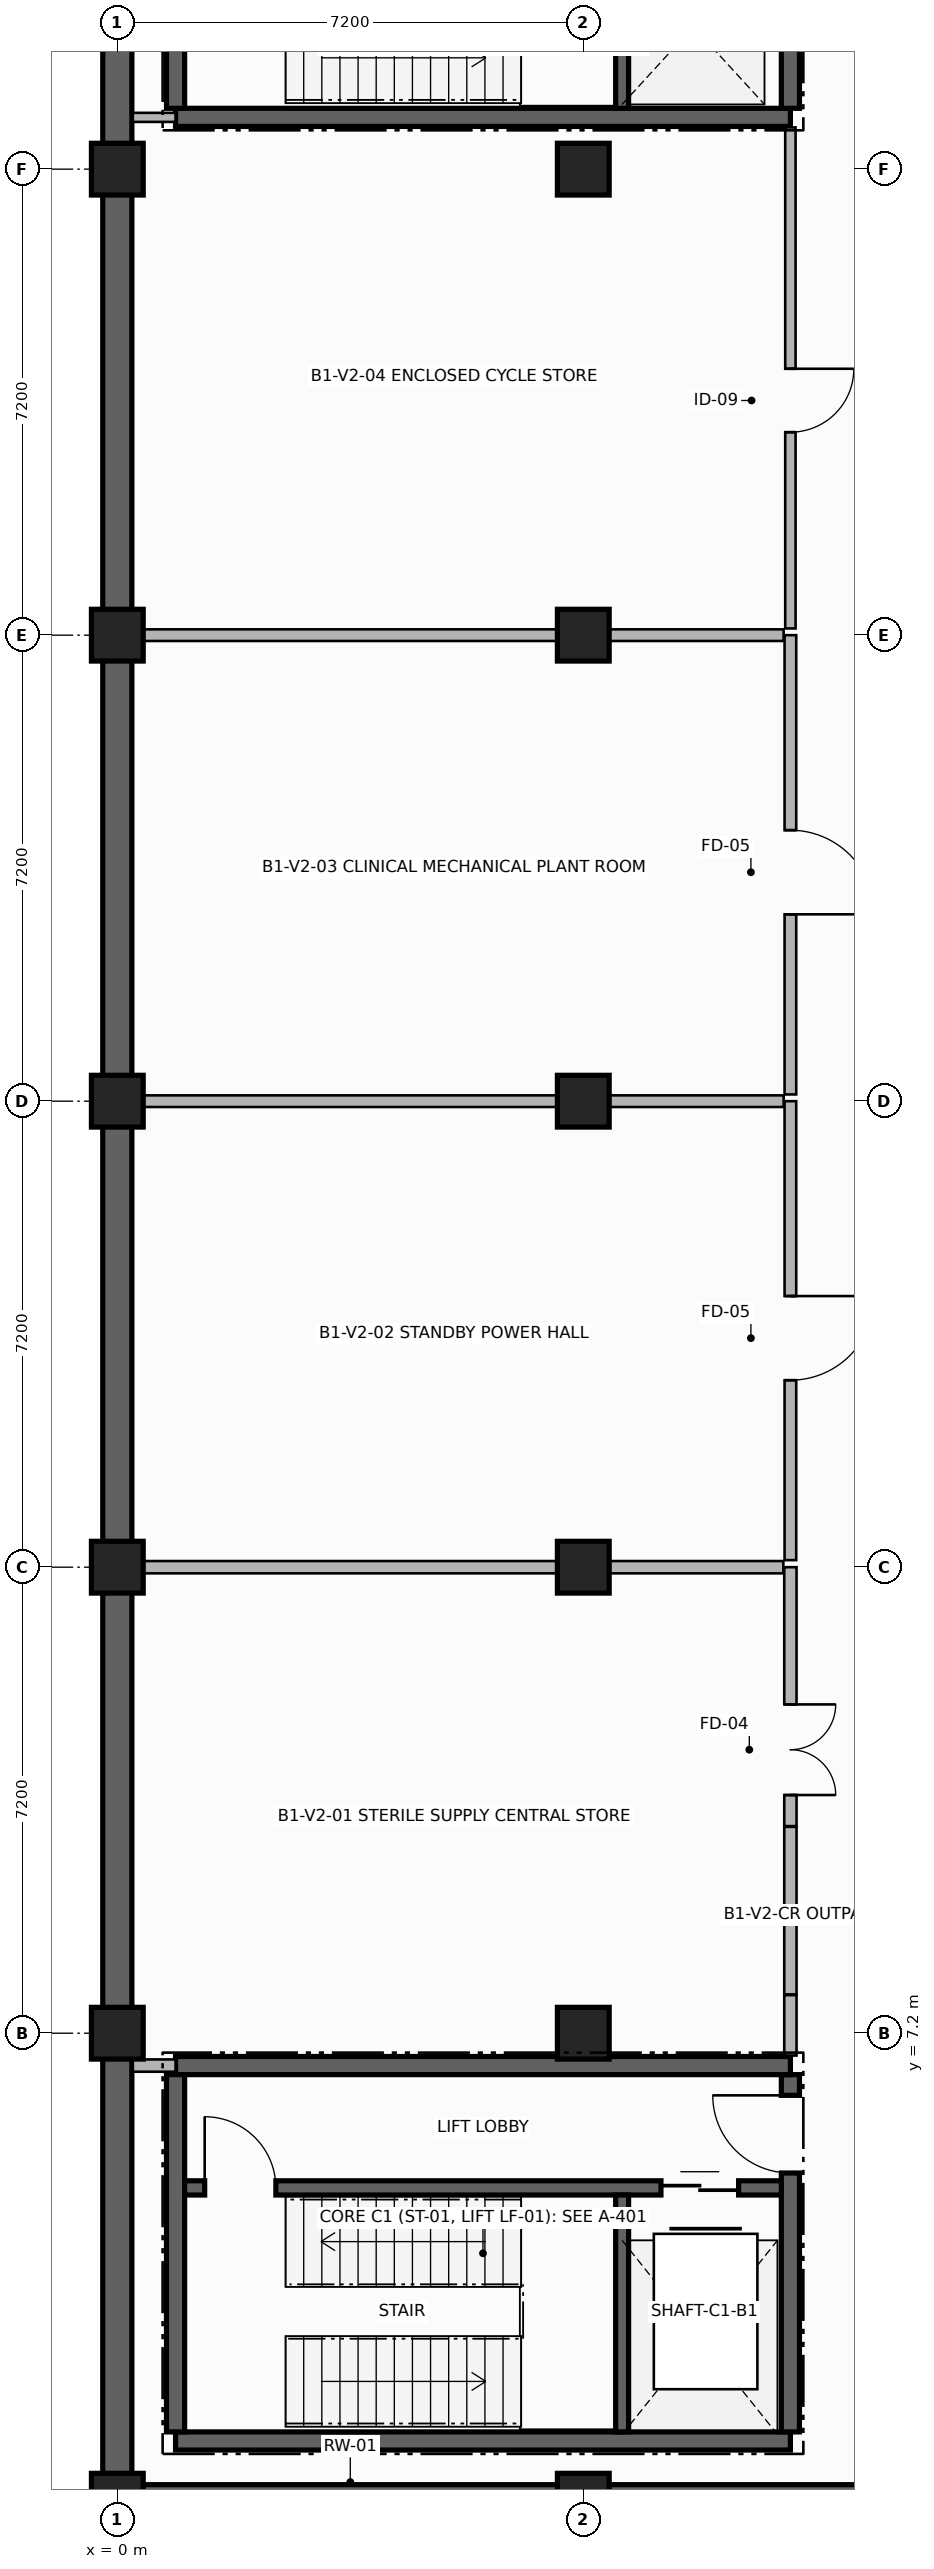
"""IFC4 building model, lengths in metres.
Left out: names, types, materials, properties, quantities, classifications, styles, units other than length and angle.
Written with IfcOpenShell. Run it as: python <this file> out.ifc"""

import sys

from ifc_helpers import new_model, si_unit, direction, frame, frame_2d, origin, origin_2d, place, context, subcontext, project, spatial, rectangle, extrude, element, fill, save


model = new_model("IFC4")
c1 = context("Model", 3, precision=1e-05, world=origin(), true_north=direction((0.0, 1.0)))
c2 = subcontext(c1, "Body", "Model", "MODEL_VIEW")
j1 = project(units=[si_unit("LENGTHUNIT", "METRE"), si_unit("PLANEANGLEUNIT", "RADIAN")], contexts=[c1])
p1 = place(None, origin())
s1 = spatial("IfcSite", under=j1, at=p1, CompositionType="ELEMENT")
p2 = place(p1, origin())
s2 = spatial("IfcBuilding", under=s1, at=p2, CompositionType="ELEMENT")
p3 = place(p2, frame((0.0, 0.0, -4.2)))
s3 = spatial("IfcBuildingStorey", under=s2, at=p3, CompositionType="ELEMENT", Elevation=-4.2)
for number, where, z_axis, x_axis in (
    (1, (0.0, 0.0, -0.4), (0.0, 0.0, 1.0), (1.0, 0.0, 0.0)),
    (2, (0.0, 7.2, -0.4), (0.0, 0.0, 1.0), (1.0, 0.0, 0.0)),
    (3, (0.0, 14.4, -0.4), (0.0, 0.0, 1.0), (1.0, 0.0, 0.0)),
    (4, (0.0, 21.6, -0.4), (0.0, 0.0, 1.0), (1.0, 0.0, 0.0)),
    (5, (0.0, 28.8, -0.4), (0.0, 0.0, 1.0), (1.0, 0.0, 0.0)),
    (6, (0.0, 36.0, -0.4), (0.0, 0.0, 1.0), (1.0, 0.0, 0.0)),
    (7, (7.2, 0.0, -0.4), (0.0, 0.0, 1.0), (1.0, 0.0, 0.0)),
    (8, (7.2, 7.2, -0.4), (0.0, 0.0, 1.0), (1.0, 0.0, 0.0)),
    (9, (7.2, 14.4, -0.4), (0.0, 0.0, 1.0), (1.0, 0.0, 0.0)),
    (10, (7.2, 21.6, -0.4), (0.0, 0.0, 1.0), (1.0, 0.0, 0.0)),
    (11, (7.2, 28.8, -0.4), (0.0, 0.0, 1.0), (1.0, 0.0, 0.0)),
    (12, (7.2, 36.0, -0.4), (0.0, 0.0, 1.0), (1.0, 0.0, 0.0)),
):
    element("IfcColumn", number, at=place(p3, frame(where, z_axis=z_axis, x_axis=x_axis)), inside=s3, PredefinedType="COLUMN", context=c2, shape_type="SweptSolid", body=[
        extrude(rectangle(XDim=0.8, YDim=0.8, at=origin_2d()), origin(), (0.0, 0.0, 1.0), 4.32),
    ])
for number, where, z_axis, x_axis in (
    (13, (0.0, 0.0, 0.0), (0.0, 0.0, 1.0), (1.0, 0.0, 0.0)),
    (14, (7.2, 0.0, 0.0), (0.0, 0.0, 1.0), (1.0, 0.0, 0.0)),
    (15, (0.0, 43.2, 0.0), (0.0, 0.0, 1.0), (0.0, -1.0, 0.0)),
    (16, (0.0, 36.0, 0.0), (0.0, 0.0, 1.0), (0.0, -1.0, 0.0)),
    (17, (0.0, 28.8, 0.0), (0.0, 0.0, 1.0), (0.0, -1.0, 0.0)),
):
    element("IfcWall", number, at=place(p3, frame(where, z_axis=z_axis, x_axis=x_axis)), inside=s3, PredefinedType="ELEMENTEDWALL", context=c2, shape_type="SweptSolid", body=[
        extrude(rectangle(XDim=7.2, YDim=0.45, at=frame_2d((3.6, 0.0))), origin(), (0.0, 0.0, 1.0), 3.32),
    ])
p4 = place(p3, frame((0.0, 21.6, 0.0), z_axis=(0.0, 0.0, 1.0), x_axis=(0.0, -1.0, 0.0)))
e18 = element("IfcWall", 18, at=p4, inside=s3, PredefinedType="ELEMENTEDWALL", context=c2, shape_type="SweptSolid", body=[
    extrude(rectangle(XDim=7.2, YDim=0.45, at=frame_2d((3.6, 0.0))), origin(), (0.0, 0.0, 1.0), 3.32),
])
for number, where, z_axis, x_axis in (
    (19, (0.0, 14.4, 0.0), (0.0, 0.0, 1.0), (0.0, -1.0, 0.0)),
    (20, (0.0, 7.2, 0.0), (0.0, 0.0, 1.0), (0.0, -1.0, 0.0)),
):
    element("IfcWall", number, at=place(p3, frame(where, z_axis=z_axis, x_axis=x_axis)), inside=s3, PredefinedType="ELEMENTEDWALL", context=c2, shape_type="SweptSolid", body=[
        extrude(rectangle(XDim=7.2, YDim=0.45, at=frame_2d((3.6, 0.0))), origin(), (0.0, 0.0, 1.0), 3.32),
    ])
p5 = place(p3, frame((0.9, 0.9, 0.0), z_axis=(0.0, 0.0, 1.0), x_axis=(1.0, 0.0, 0.0)))
e21 = element("IfcWall", 21, at=p5, inside=s3, PredefinedType="SHEAR", context=c2, shape_type="SweptSolid", body=[
    extrude(rectangle(XDim=9.5, YDim=0.28, at=frame_2d((4.75, 0.0))), origin(), (0.0, 0.0, 1.0), 3.9),
])
p6 = place(p3, frame((10.4, 1.04, 0.0), z_axis=(0.0, 0.0, 1.0), x_axis=(0.0, 1.0, 0.0)))
e22 = element("IfcWall", 22, at=p6, inside=s3, PredefinedType="SHEAR", context=c2, shape_type="SweptSolid", body=[
    extrude(rectangle(XDim=5.52, YDim=0.28, at=frame_2d((2.76, 0.0))), origin(), (0.0, 0.0, 1.0), 3.9),
])
p7 = place(p6, frame((4.0, 0.0, 0.0)))
e23 = element("IfcOpeningElement", 23, at=p7, cuts=e22, PredefinedType="OPENING", context=c2, shape_type="SweptSolid", body=[
    extrude(rectangle(XDim=1.2, YDim=2.25, at=frame_2d((0.6, 1.125))), frame((0.0, 0.15, 0.0), z_axis=(0.0, -1.0, 0.0), x_axis=(1.0, 0.0, 0.0)), (0.0, 0.0, 1.0), 0.3),
])
p8 = place(p3, frame((10.4, 6.7, 0.0), z_axis=(0.0, 0.0, 1.0), x_axis=(-1.0, 0.0, 0.0)))
e24 = element("IfcWall", 24, at=p8, inside=s3, PredefinedType="SHEAR", context=c2, shape_type="SweptSolid", body=[
    extrude(rectangle(XDim=9.5, YDim=0.28, at=frame_2d((4.75, 0.0))), origin(), (0.0, 0.0, 1.0), 3.9),
])
p9 = place(p3, frame((0.9, 6.56, 0.0), z_axis=(0.0, 0.0, 1.0), x_axis=(0.0, -1.0, 0.0)))
e25 = element("IfcWall", 25, at=p9, inside=s3, PredefinedType="SHEAR", context=c2, shape_type="SweptSolid", body=[
    extrude(rectangle(XDim=5.52, YDim=0.28, at=frame_2d((2.76, 0.0))), origin(), (0.0, 0.0, 1.0), 3.9),
])
p10 = place(p3, frame((1.04, 4.81, 0.0), z_axis=(0.0, 0.0, 1.0), x_axis=(1.0, 0.0, 0.0)))
e26 = element("IfcWall", 26, at=p10, inside=s3, PredefinedType="SHEAR", context=c2, shape_type="SweptSolid", body=[
    extrude(rectangle(XDim=9.22, YDim=0.22, at=frame_2d((4.61, 0.0))), origin(), (0.0, 0.0, 1.0), 3.9),
])
p11 = place(p10, frame((0.31, 0.0, 0.0)))
e27 = element("IfcOpeningElement", 27, at=p11, cuts=e26, PredefinedType="OPENING", context=c2, shape_type="SweptSolid", body=[
    extrude(rectangle(XDim=1.1, YDim=2.15, at=frame_2d((0.55, 1.075))), frame((0.0, 0.12, 0.0), z_axis=(0.0, -1.0, 0.0), x_axis=(1.0, 0.0, 0.0)), (0.0, 0.0, 1.0), 0.24),
])
p12 = place(p10, frame((7.36, 0.0, 0.0)))
e28 = element("IfcOpeningElement", 28, at=p12, cuts=e26, PredefinedType="OPENING", context=c2, shape_type="SweptSolid", body=[
    extrude(rectangle(XDim=1.2, YDim=2.2, at=frame_2d((0.6, 1.1))), frame((0.0, 0.12, 0.0), z_axis=(0.0, -1.0, 0.0), x_axis=(1.0, 0.0, 0.0)), (0.0, 0.0, 1.0), 0.24),
])
p13 = place(p3, frame((7.8, 1.04, 0.0), z_axis=(0.0, 0.0, 1.0), x_axis=(0.0, 1.0, 0.0)))
e29 = element("IfcWall", 29, at=p13, inside=s3, PredefinedType="SHEAR", context=c2, shape_type="SweptSolid", body=[
    extrude(rectangle(XDim=3.66, YDim=0.2, at=frame_2d((1.83, 0.0))), origin(), (0.0, 0.0, 1.0), 3.9),
])
p14 = place(p3, frame((0.9, 36.8, 0.0), z_axis=(0.0, 0.0, 1.0), x_axis=(1.0, 0.0, 0.0)))
e30 = element("IfcWall", 30, at=p14, inside=s3, PredefinedType="SHEAR", context=c2, shape_type="SweptSolid", body=[
    extrude(rectangle(XDim=9.5, YDim=0.28, at=frame_2d((4.75, 0.0))), origin(), (0.0, 0.0, 1.0), 3.9),
])
p15 = place(p3, frame((10.4, 36.94, 0.0), z_axis=(0.0, 0.0, 1.0), x_axis=(0.0, 1.0, 0.0)))
e31 = element("IfcWall", 31, at=p15, inside=s3, PredefinedType="SHEAR", context=c2, shape_type="SweptSolid", body=[
    extrude(rectangle(XDim=5.52, YDim=0.28, at=frame_2d((2.76, 0.0))), origin(), (0.0, 0.0, 1.0), 3.9),
])
p16 = place(p15, frame((4.0, 0.0, 0.0)))
e32 = element("IfcOpeningElement", 32, at=p16, cuts=e31, PredefinedType="OPENING", context=c2, shape_type="SweptSolid", body=[
    extrude(rectangle(XDim=1.2, YDim=2.25, at=frame_2d((0.6, 1.125))), frame((0.0, 0.15, 0.0), z_axis=(0.0, -1.0, 0.0), x_axis=(1.0, 0.0, 0.0)), (0.0, 0.0, 1.0), 0.3),
])
p17 = place(p3, frame((0.9, 42.46, 0.0), z_axis=(0.0, 0.0, 1.0), x_axis=(0.0, -1.0, 0.0)))
e33 = element("IfcWall", 33, at=p17, inside=s3, PredefinedType="SHEAR", context=c2, shape_type="SweptSolid", body=[
    extrude(rectangle(XDim=5.52, YDim=0.28, at=frame_2d((2.76, 0.0))), origin(), (0.0, 0.0, 1.0), 3.9),
])
p18 = place(p3, frame((7.8, 36.94, 0.0), z_axis=(0.0, 0.0, 1.0), x_axis=(0.0, 1.0, 0.0)))
e34 = element("IfcWall", 34, at=p18, inside=s3, PredefinedType="SHEAR", context=c2, shape_type="SweptSolid", body=[
    extrude(rectangle(XDim=3.66, YDim=0.2, at=frame_2d((1.83, 0.0))), origin(), (0.0, 0.0, 1.0), 3.9),
])
p19 = place(p3, frame((10.4, 14.4, 0.0), z_axis=(0.0, 0.0, 1.0), x_axis=(0.0, -1.0, 0.0)))
e35 = element("IfcWall", 35, at=p19, inside=s3, PredefinedType="PARTITIONING", context=c2, shape_type="SweptSolid", body=[
    extrude(rectangle(XDim=4.0, YDim=0.19, at=frame_2d((2.0, 0.0))), origin(), (0.0, 0.0, 1.0), 3.26),
])
p20 = place(p19, frame((2.12, 0.0, 0.0)))
e36 = element("IfcOpeningElement", 36, at=p20, cuts=e35, PredefinedType="OPENING", context=c2, shape_type="SweptSolid", body=[
    extrude(rectangle(XDim=1.4, YDim=2.25, at=frame_2d((0.7, 1.125))), frame((0.0, 0.105, 0.0), z_axis=(0.0, -1.0, 0.0), x_axis=(1.0, 0.0, 0.0)), (0.0, 0.0, 1.0), 0.21),
])
p21 = place(p3, frame((10.4, 10.388, 0.0), z_axis=(0.0, 0.0, 1.0), x_axis=(0.0, -1.0, 0.0)))
e37 = element("IfcWall", 37, at=p21, inside=s3, PredefinedType="PARTITIONING", context=c2, shape_type="SweptSolid", body=[
    extrude(rectangle(XDim=2.588, YDim=0.19, at=frame_2d((1.294, 0.0))), origin(), (0.0, 0.0, 1.0), 3.26),
])
p22 = place(p3, frame((10.4, 7.788, 0.0), z_axis=(0.0, 0.0, 1.0), x_axis=(0.0, -1.0, 0.0)))
e38 = element("IfcWall", 38, at=p22, inside=s3, PredefinedType="PARTITIONING", context=c2, shape_type="SweptSolid", body=[
    extrude(rectangle(XDim=0.933, YDim=0.19, at=frame_2d((0.467, 0.0))), origin(), (0.0, 0.0, 1.0), 3.26),
])
p23 = place(p3, frame((0.9, 6.7, 0.0), z_axis=(0.0, 0.0, 1.0), x_axis=(-1.0, 0.0, 0.0)))
e39 = element("IfcWall", 39, at=p23, inside=s3, PredefinedType="PARTITIONING", context=c2, shape_type="SweptSolid", body=[
    extrude(rectangle(XDim=0.66, YDim=0.19, at=frame_2d((0.33, 0.0))), origin(), (0.0, 0.0, 1.0), 3.26),
])
p24 = place(p3, frame((0.24, 14.4, 0.0), z_axis=(0.0, 0.0, 1.0), x_axis=(1.0, 0.0, 0.0)))
e40 = element("IfcWall", 40, at=p24, inside=s3, PredefinedType="PARTITIONING", context=c2, shape_type="SweptSolid", body=[
    extrude(rectangle(XDim=10.051, YDim=0.19, at=frame_2d((5.025, 0.0))), origin(), (0.0, 0.0, 1.0), 3.26),
])
p25 = place(p3, frame((10.4, 21.6, 0.0), z_axis=(0.0, 0.0, 1.0), x_axis=(0.0, -1.0, 0.0)))
e41 = element("IfcWall", 41, at=p25, inside=s3, PredefinedType="PARTITIONING", context=c2, shape_type="SweptSolid", body=[
    extrude(rectangle(XDim=7.091, YDim=0.18, at=frame_2d((3.545, 0.0))), origin(), (0.0, 0.0, 1.0), 3.26),
])
p26 = place(p25, frame((3.011, 0.0, 0.0)))
e42 = element("IfcOpeningElement", 42, at=p26, cuts=e41, PredefinedType="OPENING", context=c2, shape_type="SweptSolid", body=[
    extrude(rectangle(XDim=1.3, YDim=2.2, at=frame_2d((0.65, 1.1))), frame((0.0, 0.1, 0.0), z_axis=(0.0, -1.0, 0.0), x_axis=(1.0, 0.0, 0.0)), (0.0, 0.0, 1.0), 0.2),
])
p27 = place(p3, frame((0.24, 21.6, 0.0), z_axis=(0.0, 0.0, 1.0), x_axis=(1.0, 0.0, 0.0)))
e43 = element("IfcWall", 43, at=p27, inside=s3, PredefinedType="PARTITIONING", context=c2, shape_type="SweptSolid", body=[
    extrude(rectangle(XDim=10.056, YDim=0.18, at=frame_2d((5.028, 0.0))), origin(), (0.0, 0.0, 1.0), 3.26),
])
p28 = place(p3, frame((10.4, 28.8, 0.0), z_axis=(0.0, 0.0, 1.0), x_axis=(0.0, -1.0, 0.0)))
e44 = element("IfcWall", 44, at=p28, inside=s3, PredefinedType="PARTITIONING", context=c2, shape_type="SweptSolid", body=[
    extrude(rectangle(XDim=7.096, YDim=0.18, at=frame_2d((3.548, 0.0))), origin(), (0.0, 0.0, 1.0), 3.26),
])
p29 = place(p28, frame((3.013, 0.0, 0.0)))
e45 = element("IfcOpeningElement", 45, at=p29, cuts=e44, PredefinedType="OPENING", context=c2, shape_type="SweptSolid", body=[
    extrude(rectangle(XDim=1.3, YDim=2.2, at=frame_2d((0.65, 1.1))), frame((0.0, 0.1, 0.0), z_axis=(0.0, -1.0, 0.0), x_axis=(1.0, 0.0, 0.0)), (0.0, 0.0, 1.0), 0.2),
])
p30 = place(p3, frame((0.24, 28.8, 0.0), z_axis=(0.0, 0.0, 1.0), x_axis=(1.0, 0.0, 0.0)))
e46 = element("IfcWall", 46, at=p30, inside=s3, PredefinedType="PARTITIONING", context=c2, shape_type="SweptSolid", body=[
    extrude(rectangle(XDim=10.056, YDim=0.18, at=frame_2d((5.028, 0.0))), origin(), (0.0, 0.0, 1.0), 3.26),
])
p31 = place(p3, frame((10.4, 36.645, 0.0), z_axis=(0.0, 0.0, 1.0), x_axis=(0.0, -1.0, 0.0)))
e47 = element("IfcWall", 47, at=p31, inside=s3, PredefinedType="PARTITIONING", context=c2, shape_type="SweptSolid", body=[
    extrude(rectangle(XDim=7.741, YDim=0.16, at=frame_2d((3.871, 0.0))), origin(), (0.0, 0.0, 1.0), 3.26),
])
p32 = place(p31, frame((3.729, 0.0, 0.0)))
e48 = element("IfcOpeningElement", 48, at=p32, cuts=e47, PredefinedType="OPENING", context=c2, shape_type="SweptSolid", body=[
    extrude(rectangle(XDim=0.98, YDim=2.15, at=frame_2d((0.49, 1.075))), frame((0.0, 0.09, 0.0), z_axis=(0.0, -1.0, 0.0), x_axis=(1.0, 0.0, 0.0)), (0.0, 0.0, 1.0), 0.18),
])
p33 = place(p3, frame((0.24, 36.8, 0.0), z_axis=(0.0, 0.0, 1.0), x_axis=(1.0, 0.0, 0.0)))
e49 = element("IfcWall", 49, at=p33, inside=s3, PredefinedType="PARTITIONING", context=c2, shape_type="SweptSolid", body=[
    extrude(rectangle(XDim=0.66, YDim=0.14, at=frame_2d((0.33, 0.0))), origin(), (0.0, 0.0, 1.0), 3.26),
])
p34 = place(p11, origin())
e50 = element("IfcDoor", 50, at=p34, inside=s3, OperationType="SINGLE_SWING_LEFT", PredefinedType="DOOR", context=c2, shape_type="SweptSolid", body=[
    extrude(rectangle(XDim=1.1, YDim=2.15, at=frame_2d((0.55, 1.075))), frame((0.0, 0.025, 0.0), z_axis=(0.0, -1.0, 0.0), x_axis=(1.0, 0.0, 0.0)), (0.0, 0.0, 1.0), 0.05),
])
fill(e27, e50)
p35 = place(p12, origin())
e51 = element("IfcDoor", 51, at=p35, inside=s3, OperationType="DOUBLE_DOOR_SLIDING", PredefinedType="DOOR", context=c2, shape_type="SweptSolid", body=[
    extrude(rectangle(XDim=1.2, YDim=2.2, at=frame_2d((0.6, 1.1))), frame((0.0, 0.025, 0.0), z_axis=(0.0, -1.0, 0.0), x_axis=(1.0, 0.0, 0.0)), (0.0, 0.0, 1.0), 0.05),
])
fill(e28, e51)
p36 = place(p7, origin())
e52 = element("IfcDoor", 52, at=p36, inside=s3, OperationType="SINGLE_SWING_RIGHT", PredefinedType="DOOR", context=c2, shape_type="SweptSolid", body=[
    extrude(rectangle(XDim=1.2, YDim=2.25, at=frame_2d((0.6, 1.125))), frame((0.0, 0.025, 0.0), z_axis=(0.0, -1.0, 0.0), x_axis=(1.0, 0.0, 0.0)), (0.0, 0.0, 1.0), 0.05),
])
fill(e23, e52)
p37 = place(p20, origin())
e53 = element("IfcDoor", 53, at=p37, inside=s3, OperationType="DOUBLE_DOOR_SINGLE_SWING", PredefinedType="DOOR", context=c2, shape_type="SweptSolid", body=[
    extrude(rectangle(XDim=1.4, YDim=2.25, at=frame_2d((0.7, 1.125))), frame((0.0, 0.025, 0.0), z_axis=(0.0, -1.0, 0.0), x_axis=(1.0, 0.0, 0.0)), (0.0, 0.0, 1.0), 0.05),
])
fill(e36, e53)
p38 = place(p26, origin())
e54 = element("IfcDoor", 54, at=p38, inside=s3, OperationType="SINGLE_SWING_LEFT", PredefinedType="DOOR", context=c2, shape_type="SweptSolid", body=[
    extrude(rectangle(XDim=1.3, YDim=2.2, at=frame_2d((0.65, 1.1))), frame((0.0, 0.025, 0.0), z_axis=(0.0, -1.0, 0.0), x_axis=(1.0, 0.0, 0.0)), (0.0, 0.0, 1.0), 0.05),
])
fill(e42, e54)
p39 = place(p29, origin())
e55 = element("IfcDoor", 55, at=p39, inside=s3, OperationType="SINGLE_SWING_RIGHT", PredefinedType="DOOR", context=c2, shape_type="SweptSolid", body=[
    extrude(rectangle(XDim=1.3, YDim=2.2, at=frame_2d((0.65, 1.1))), frame((0.0, 0.025, 0.0), z_axis=(0.0, -1.0, 0.0), x_axis=(1.0, 0.0, 0.0)), (0.0, 0.0, 1.0), 0.05),
])
fill(e45, e55)
p40 = place(p32, origin())
e56 = element("IfcDoor", 56, at=p40, inside=s3, OperationType="SINGLE_SWING_LEFT", PredefinedType="DOOR", context=c2, shape_type="SweptSolid", body=[
    extrude(rectangle(XDim=0.98, YDim=2.15, at=frame_2d((0.49, 1.075))), frame((0.0, 0.025, 0.0), z_axis=(0.0, -1.0, 0.0), x_axis=(1.0, 0.0, 0.0)), (0.0, 0.0, 1.0), 0.05),
])
fill(e48, e56)
save(model, sys.argv[1])
